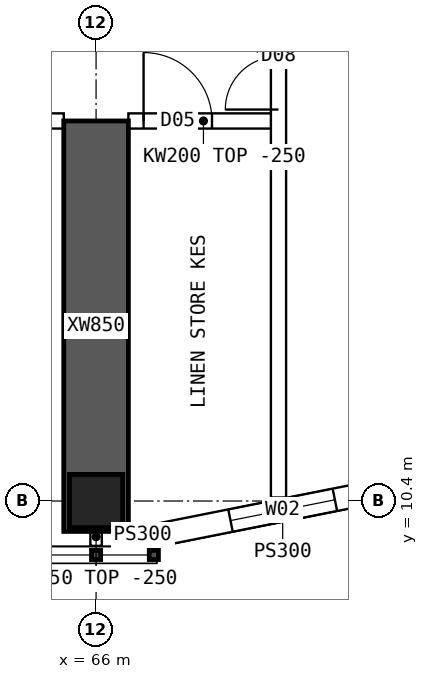
"""IFC4 building model, lengths in metres.
Left out: names, types, materials, properties, quantities, classifications, styles, units other than length and angle.
Written with IfcOpenShell. Run it as: python <this file> out.ifc"""

import sys

from ifc_helpers import new_model, si_unit, direction, frame, frame_2d, origin, origin_2d, place, context, subcontext, project, spatial, polyline, rectangle, hollow_rectangle, outline, extrude, element, fill, save


model = new_model("IFC4")
c1 = context("Model", 3, precision=1e-05, world=origin(), true_north=direction((0.0, 1.0)))
c2 = subcontext(c1, "Body", "Model", "MODEL_VIEW")
j1 = project(units=[si_unit("LENGTHUNIT", "METRE"), si_unit("PLANEANGLEUNIT", "RADIAN")], contexts=[c1])
p1 = place(None, origin())
s1 = spatial("IfcSite", under=j1, at=p1, CompositionType="ELEMENT")
p2 = place(p1, origin())
s2 = spatial("IfcBuilding", under=s1, at=p2, CompositionType="ELEMENT")
p3 = place(p2, frame((0.0, 0.0, 148.6)))
s3 = spatial("IfcBuildingStorey", under=s2, at=p3, CompositionType="ELEMENT", Elevation=148.6)
p4 = place(p3, frame((66.0, 10.4, 0.0), z_axis=(0.0, 0.0, 1.0), x_axis=(1.0, 0.0, 0.0)))
e1 = element("IfcColumn", 1, at=p4, inside=s3, PredefinedType="COLUMN", context=c2, shape_type="SweptSolid", body=[
    extrude(hollow_rectangle(XDim=0.7, YDim=0.7, WallThickness=0.07, at=origin_2d()), origin(), (0.0, 0.0, 1.0), 3.75),
])
p5 = place(p3, frame((66.0, 10.0, 0.0), z_axis=(0.0, 0.0, 1.0), x_axis=(0.0, 1.0, 0.0)))
e2 = element("IfcWall", 2, at=p5, inside=s3, PredefinedType="SHEAR", context=c2, shape_type="SweptSolid", body=[
    extrude(rectangle(XDim=5.4, YDim=0.85, at=frame_2d((2.7, 0.0))), origin(), (0.0, 0.0, 1.0), 3.75),
])
p6 = place(p3, frame((66.8, 9.95, 0.0), z_axis=(0.0, 0.0, 1.0), x_axis=(0.98078325777, 0.195100490205, 0.0)))
e3 = element("IfcWall", 3, at=p6, inside=s3, PredefinedType="SOLIDWALL", context=c2, shape_type="SweptSolid", body=[
    extrude(outline(polyline([(-0.03, -0.15), (3.405, -0.15), (3.345, 0.15), (0.03, 0.15), (-0.03, -0.15)])), origin(), (0.0, 0.0, 1.0), 3.5),
])
p7 = place(p6, frame((0.988, 0.0, 0.9)))
e4 = element("IfcOpeningElement", 4, at=p7, cuts=e3, PredefinedType="OPENING", context=c2, shape_type="SweptSolid", body=[
    extrude(rectangle(XDim=1.4, YDim=1.8, at=frame_2d((0.7, 0.9))), frame((0.0, 0.16, 0.0), z_axis=(0.0, -1.0, 0.0), x_axis=(1.0, 0.0, 0.0)), (0.0, 0.0, 1.0), 0.32),
])
p8 = place(p3, frame((66.8, 9.95, 0.0), z_axis=(0.0, 0.0, 1.0), x_axis=(-1.0, 0.0, 0.0)))
e5 = element("IfcWall", 5, at=p8, inside=s3, PredefinedType="SOLIDWALL", context=c2, shape_type="SweptSolid", body=[
    extrude(rectangle(XDim=0.375, YDim=0.3, at=frame_2d((0.188, 0.0))), origin(), (0.0, 0.0, 1.0), 3.5),
])
p9 = place(p3, frame((60.425, 15.4, 0.0), z_axis=(0.0, 0.0, 1.0), x_axis=(1.0, 0.0, 0.0)))
e6 = element("IfcWall", 6, at=p9, inside=s3, PredefinedType="SOLIDWALL", context=c2, shape_type="SweptSolid", body=[
    extrude(outline(polyline([(0.0, 0.0), (5.15, 0.0), (5.15, 3.1), (0.0, 3.1), (0.0, 0.0)])), frame((0.0, 0.1, 0.0), z_axis=(0.0, -1.0, 0.0), x_axis=(1.0, 0.0, 0.0)), (0.0, 0.0, 1.0), 0.2),
])
p10 = place(p9, frame((0.6, 0.0, 0.0)))
e7 = element("IfcOpeningElement", 7, at=p10, cuts=e6, PredefinedType="OPENING", context=c2, shape_type="SweptSolid", body=[
    extrude(rectangle(XDim=1.0, YDim=2.1, at=frame_2d((0.5, 1.05))), frame((0.0, 0.11, 0.0), z_axis=(0.0, -1.0, 0.0), x_axis=(1.0, 0.0, 0.0)), (0.0, 0.0, 1.0), 0.22),
])
p11 = place(p3, frame((66.425, 15.4, 0.0), z_axis=(0.0, 0.0, 1.0), x_axis=(1.0, 0.0, 0.0)))
e8 = element("IfcWall", 8, at=p11, inside=s3, PredefinedType="SOLIDWALL", context=c2, shape_type="SweptSolid", body=[
    extrude(rectangle(XDim=1.975, YDim=0.2, at=frame_2d((0.987, 0.0))), origin(), (0.0, 0.0, 1.0), 3.5),
])
p12 = place(p11, frame((0.2, 0.0, 0.0)))
e9 = element("IfcOpeningElement", 9, at=p12, cuts=e8, PredefinedType="OPENING", context=c2, shape_type="SweptSolid", body=[
    extrude(rectangle(XDim=0.9, YDim=2.1, at=frame_2d((0.45, 1.05))), frame((0.0, 0.11, 0.0), z_axis=(0.0, -1.0, 0.0), x_axis=(1.0, 0.0, 0.0)), (0.0, 0.0, 1.0), 0.22),
])
p13 = place(p3, frame((68.4, 10.446, 0.0), z_axis=(0.0, 0.0, 1.0), x_axis=(0.0, 1.0, 0.0)))
e10 = element("IfcWall", 10, at=p13, inside=s3, PredefinedType="SOLIDWALL", context=c2, shape_type="SweptSolid", body=[
    extrude(rectangle(XDim=43.107, YDim=0.2, at=frame_2d((21.554, 0.0))), origin(), (0.0, 0.0, 1.0), 3.5),
])
p14 = place(p13, frame((27.994, 0.0, 0.0)))
e11 = element("IfcOpeningElement", 11, at=p14, cuts=e10, PredefinedType="OPENING", context=c2, shape_type="SweptSolid", body=[
    extrude(rectangle(XDim=1.2, YDim=2.1, at=frame_2d((0.6, 1.05))), frame((0.0, 0.11, 0.0), z_axis=(0.0, -1.0, 0.0), x_axis=(1.0, 0.0, 0.0)), (0.0, 0.0, 1.0), 0.22),
])
p15 = place(p13, frame((5.104, 0.0, 0.0)))
e12 = element("IfcOpeningElement", 12, at=p15, cuts=e10, PredefinedType="OPENING", context=c2, shape_type="SweptSolid", body=[
    extrude(rectangle(XDim=1.4, YDim=2.1, at=frame_2d((0.7, 1.05))), frame((0.0, 0.11, 0.0), z_axis=(0.0, -1.0, 0.0), x_axis=(1.0, 0.0, 0.0)), (0.0, 0.0, 1.0), 0.22),
])
p16 = place(p13, frame((36.504, 0.0, 0.0)))
e13 = element("IfcOpeningElement", 13, at=p16, cuts=e10, PredefinedType="OPENING", context=c2, shape_type="SweptSolid", body=[
    extrude(rectangle(XDim=1.4, YDim=2.1, at=frame_2d((0.7, 1.05))), frame((0.0, 0.11, 0.0), z_axis=(0.0, -1.0, 0.0), x_axis=(1.0, 0.0, 0.0)), (0.0, 0.0, 1.0), 0.22),
])
p17 = place(p3, frame((66.0, 10.05, 0.0), z_axis=(0.0, 0.0, 1.0), x_axis=(0.0, -1.0, 0.0)))
e14 = element("IfcWall", 14, at=p17, inside=s3, PredefinedType="PARTITIONING", context=c2, shape_type="SweptSolid", body=[
    extrude(rectangle(XDim=0.24, YDim=0.15, at=frame_2d((0.12, 0.0))), origin(), (0.0, 0.0, 1.0), 3.5),
])
p18 = place(p7, origin())
e15 = element("IfcWindow", 15, at=p18, inside=s3, PartitioningType="SINGLE_PANEL", PredefinedType="WINDOW", context=c2, shape_type="SweptSolid", body=[
    extrude(rectangle(XDim=1.4, YDim=1.8, at=frame_2d((0.7, 0.9))), frame((0.0, 0.03, 0.0), z_axis=(0.0, -1.0, 0.0), x_axis=(1.0, 0.0, 0.0)), (0.0, 0.0, 1.0), 0.06),
])
fill(e4, e15)
p19 = place(p15, origin())
e16 = element("IfcDoor", 16, at=p19, inside=s3, OperationType="DOUBLE_DOOR_SINGLE_SWING", PredefinedType="DOOR", context=c2, shape_type="SweptSolid", body=[
    extrude(rectangle(XDim=1.4, YDim=2.1, at=frame_2d((0.7, 1.05))), frame((0.0, 0.025, 0.0), z_axis=(0.0, -1.0, 0.0), x_axis=(1.0, 0.0, 0.0)), (0.0, 0.0, 1.0), 0.05),
])
fill(e12, e16)
p20 = place(p12, origin())
e17 = element("IfcDoor", 17, at=p20, inside=s3, OperationType="SINGLE_SWING_LEFT", PredefinedType="DOOR", context=c2, shape_type="SweptSolid", body=[
    extrude(rectangle(XDim=0.9, YDim=2.1, at=frame_2d((0.45, 1.05))), frame((0.0, 0.025, 0.0), z_axis=(0.0, -1.0, 0.0), x_axis=(1.0, 0.0, 0.0)), (0.0, 0.0, 1.0), 0.05),
])
fill(e9, e17)
save(model, sys.argv[1])
